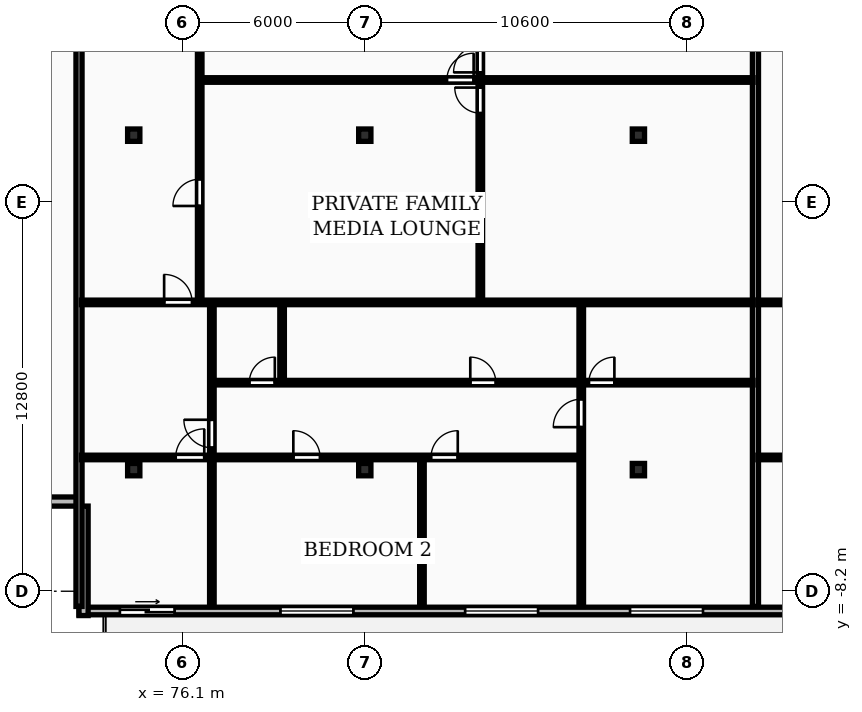
"""IFC4 building model, lengths in metres.
Left out: names, types, materials, properties, quantities, classifications, styles, units other than length and angle.
Written with IfcOpenShell. Run it as: python <this file> out.ifc"""

import sys

from ifc_helpers import new_model, si_unit, direction, frame, frame_2d, origin, origin_2d, place, context, subcontext, project, spatial, rectangle, i_section, extrude, element, fill, save


model = new_model("IFC4")
c1 = context("Model", 3, precision=1e-05, world=origin(), true_north=direction((0.0, 1.0)))
c2 = subcontext(c1, "Body", "Model", "MODEL_VIEW")
j1 = project(units=[si_unit("LENGTHUNIT", "METRE"), si_unit("PLANEANGLEUNIT", "RADIAN")], contexts=[c1])
p1 = place(None, origin())
s1 = spatial("IfcSite", under=j1, at=p1, CompositionType="ELEMENT")
p2 = place(p1, origin())
s2 = spatial("IfcBuilding", under=s1, at=p2, CompositionType="ELEMENT")
p3 = place(p2, frame((0.0, 0.0, 139.3)))
s3 = spatial("IfcBuildingStorey", under=s2, at=p3, CompositionType="ELEMENT", Elevation=139.3)
for number, where, z_axis, x_axis in (
    (1, (74.5, -4.2, 0.0), (0.0, 0.0, 1.0), (1.0, 0.0, 0.0)),
    (2, (74.5, 6.8, 0.0), (0.0, 0.0, 1.0), (1.0, 0.0, 0.0)),
    (3, (82.1, -4.2, 0.0), (0.0, 0.0, 1.0), (1.0, 0.0, 0.0)),
    (4, (82.1, 6.8, 0.0), (0.0, 0.0, 1.0), (1.0, 0.0, 0.0)),
    (5, (91.1, -4.2, 0.0), (0.0, 0.0, 1.0), (1.0, 0.0, 0.0)),
    (6, (91.1, 6.8, 0.0), (0.0, 0.0, 1.0), (1.0, 0.0, 0.0)),
):
    element("IfcColumn", number, at=place(p3, frame(where, z_axis=z_axis, x_axis=x_axis)), inside=s3, PredefinedType="COLUMN", context=c2, shape_type="SweptSolid", body=[
        extrude(i_section(OverallWidth=0.403, OverallDepth=0.406, WebThickness=0.027, FlangeThickness=0.043, FilletRadius=0.015, at=origin_2d()), origin(), (0.0, 0.0, 1.0), 3.6),
    ])
p4 = place(p3, frame((72.7, -8.85, 0.0), z_axis=(0.0, 0.0, 1.0), x_axis=(1.0, 0.0, 0.0)))
e7 = element("IfcWall", 7, at=p4, inside=s3, PredefinedType="STANDARD", context=c2, shape_type="SweptSolid", body=[
    extrude(rectangle(XDim=58.0, YDim=0.25, at=frame_2d((29.0, 0.0))), origin(), (0.0, 0.0, 1.0), 3.31),
])
p5 = place(p4, frame((6.625, 0.0, 0.85)))
e8 = element("IfcOpeningElement", 8, at=p5, cuts=e7, PredefinedType="OPENING", context=c2, shape_type="SweptSolid", body=[
    extrude(rectangle(XDim=2.4, YDim=1.9, at=frame_2d((1.2, 0.95))), frame((0.0, 0.135, 0.0), z_axis=(0.0, -1.0, 0.0), x_axis=(1.0, 0.0, 0.0)), (0.0, 0.0, 1.0), 0.27),
])
p6 = place(p4, frame((12.7, 0.0, 0.85)))
e9 = element("IfcOpeningElement", 9, at=p6, cuts=e7, PredefinedType="OPENING", context=c2, shape_type="SweptSolid", body=[
    extrude(rectangle(XDim=2.4, YDim=1.9, at=frame_2d((1.2, 0.95))), frame((0.0, 0.135, 0.0), z_axis=(0.0, -1.0, 0.0), x_axis=(1.0, 0.0, 0.0)), (0.0, 0.0, 1.0), 0.27),
])
p7 = place(p4, frame((1.345, 0.0, 0.0)))
e10 = element("IfcOpeningElement", 10, at=p7, cuts=e7, PredefinedType="OPENING", context=c2, shape_type="SweptSolid", body=[
    extrude(rectangle(XDim=1.8, YDim=2.2, at=frame_2d((0.9, 1.1))), frame((0.0, 0.135, 0.0), z_axis=(0.0, -1.0, 0.0), x_axis=(1.0, 0.0, 0.0)), (0.0, 0.0, 1.0), 0.27),
])
p8 = place(p4, frame((18.125, 0.0, 0.85)))
e11 = element("IfcOpeningElement", 11, at=p8, cuts=e7, PredefinedType="OPENING", context=c2, shape_type="SweptSolid", body=[
    extrude(rectangle(XDim=2.4, YDim=1.9, at=frame_2d((1.2, 0.95))), frame((0.0, 0.135, 0.0), z_axis=(0.0, -1.0, 0.0), x_axis=(1.0, 0.0, 0.0)), (0.0, 0.0, 1.0), 0.27),
])
p9 = place(p4, frame((27.429, 0.0, 0.0)))
e12 = element("IfcOpeningElement", 12, at=p9, cuts=e7, PredefinedType="OPENING", context=c2, shape_type="SweptSolid", body=[
    extrude(rectangle(XDim=1.8, YDim=2.2, at=frame_2d((0.9, 1.1))), frame((0.0, 0.135, 0.0), z_axis=(0.0, -1.0, 0.0), x_axis=(1.0, 0.0, 0.0)), (0.0, 0.0, 1.0), 0.27),
])
p10 = place(p4, frame((35.038, 0.0, 0.85)))
e13 = element("IfcOpeningElement", 13, at=p10, cuts=e7, PredefinedType="OPENING", context=c2, shape_type="SweptSolid", body=[
    extrude(rectangle(XDim=1.8, YDim=1.8, at=frame_2d((0.9, 0.9))), frame((0.0, 0.135, 0.0), z_axis=(0.0, -1.0, 0.0), x_axis=(1.0, 0.0, 0.0)), (0.0, 0.0, 1.0), 0.27),
])
p11 = place(p4, frame((43.911, 0.0, 0.85)))
e14 = element("IfcOpeningElement", 14, at=p11, cuts=e7, PredefinedType="OPENING", context=c2, shape_type="SweptSolid", body=[
    extrude(rectangle(XDim=2.4, YDim=1.9, at=frame_2d((1.2, 0.95))), frame((0.0, 0.135, 0.0), z_axis=(0.0, -1.0, 0.0), x_axis=(1.0, 0.0, 0.0)), (0.0, 0.0, 1.0), 0.27),
])
p12 = place(p4, frame((49.387, 0.0, 0.85)))
e15 = element("IfcOpeningElement", 15, at=p12, cuts=e7, PredefinedType="OPENING", context=c2, shape_type="SweptSolid", body=[
    extrude(rectangle(XDim=2.4, YDim=1.9, at=frame_2d((1.2, 0.95))), frame((0.0, 0.135, 0.0), z_axis=(0.0, -1.0, 0.0), x_axis=(1.0, 0.0, 0.0)), (0.0, 0.0, 1.0), 0.27),
])
p13 = place(p4, frame((39.263, 0.0, 0.0)))
e16 = element("IfcOpeningElement", 16, at=p13, cuts=e7, PredefinedType="OPENING", context=c2, shape_type="SweptSolid", body=[
    extrude(rectangle(XDim=1.8, YDim=2.2, at=frame_2d((0.9, 1.1))), frame((0.0, 0.135, 0.0), z_axis=(0.0, -1.0, 0.0), x_axis=(1.0, 0.0, 0.0)), (0.0, 0.0, 1.0), 0.27),
])
p14 = place(p4, frame((54.465, 0.0, 0.85)))
e17 = element("IfcOpeningElement", 17, at=p14, cuts=e7, PredefinedType="OPENING", context=c2, shape_type="SweptSolid", body=[
    extrude(rectangle(XDim=2.4, YDim=1.9, at=frame_2d((1.2, 0.95))), frame((0.0, 0.135, 0.0), z_axis=(0.0, -1.0, 0.0), x_axis=(1.0, 0.0, 0.0)), (0.0, 0.0, 1.0), 0.27),
])
p15 = place(p3, frame((69.1, -5.25, 0.0), z_axis=(0.0, 0.0, 1.0), x_axis=(1.0, 0.0, 0.0)))
e18 = element("IfcWall", 18, at=p15, inside=s3, PredefinedType="STANDARD", context=c2, shape_type="SweptSolid", body=[
    extrude(rectangle(XDim=3.6, YDim=0.3, at=frame_2d((1.8, 0.0))), origin(), (0.0, 0.0, 1.0), 3.31),
])
p16 = place(p3, frame((72.85, -5.4, 0.0), z_axis=(0.0, 0.0, 1.0), x_axis=(0.0, -1.0, 0.0)))
e19 = element("IfcWall", 19, at=p16, inside=s3, PredefinedType="STANDARD", context=c2, shape_type="SweptSolid", body=[
    extrude(rectangle(XDim=3.6, YDim=0.3, at=frame_2d((1.8, 0.0))), origin(), (0.0, 0.0, 1.0), 3.31),
])
for number, where, z_axis, x_axis in (
    (20, (72.7, -8.7, 0.0), (0.0, 0.0, 1.0), (0.0, 1.0, 0.0)),
    (21, (94.95, -8.7, 0.0), (0.0, 0.0, 1.0), (0.0, 1.0, 0.0)),
):
    element("IfcWall", number, at=place(p3, frame(where, z_axis=z_axis, x_axis=x_axis)), inside=s3, PredefinedType="PARTITIONING", context=c2, shape_type="SweptSolid", body=[
        extrude(rectangle(XDim=24.57, YDim=0.2, at=frame_2d((12.285, 0.0))), origin(), (0.0, 0.0, 1.0), 3.31),
    ])
p17 = place(p3, frame((85.9, 1.34, 0.0), z_axis=(0.0, 0.0, 1.0), x_axis=(0.0, 1.0, 0.0)))
e22 = element("IfcWall", 22, at=p17, inside=s3, PredefinedType="PARTITIONING", context=c2, shape_type="SweptSolid", body=[
    extrude(rectangle(XDim=14.55, YDim=0.15, at=frame_2d((7.275, 0.0))), origin(), (0.0, 0.0, 1.0), 3.31),
])
p18 = place(p17, frame((6.185, 0.0, 0.0)))
e23 = element("IfcOpeningElement", 23, at=p18, cuts=e22, PredefinedType="OPENING", context=c2, shape_type="SweptSolid", body=[
    extrude(rectangle(XDim=0.84, YDim=2.04, at=frame_2d((0.42, 1.02))), frame((0.0, 0.085, 0.0), z_axis=(0.0, -1.0, 0.0), x_axis=(1.0, 0.0, 0.0)), (0.0, 0.0, 1.0), 0.17),
])
p19 = place(p17, frame((7.525, 0.0, 0.0)))
e24 = element("IfcOpeningElement", 24, at=p19, cuts=e22, PredefinedType="OPENING", context=c2, shape_type="SweptSolid", body=[
    extrude(rectangle(XDim=0.88, YDim=2.06, at=frame_2d((0.44, 1.03))), frame((0.0, 0.085, 0.0), z_axis=(0.0, -1.0, 0.0), x_axis=(1.0, 0.0, 0.0)), (0.0, 0.0, 1.0), 0.17),
])
p20 = place(p3, frame((76.73, 8.615, 0.0), z_axis=(0.0, 0.0, 1.0), x_axis=(1.0, 0.0, 0.0)))
e25 = element("IfcWall", 25, at=p20, inside=s3, PredefinedType="PARTITIONING", context=c2, shape_type="SweptSolid", body=[
    extrude(rectangle(XDim=18.14, YDim=0.15, at=frame_2d((9.07, 0.0))), origin(), (0.0, 0.0, 1.0), 3.31),
])
p21 = place(p20, frame((8.07, 0.0, 0.0)))
e26 = element("IfcOpeningElement", 26, at=p21, cuts=e25, PredefinedType="OPENING", context=c2, shape_type="SweptSolid", body=[
    extrude(rectangle(XDim=0.88, YDim=2.06, at=frame_2d((0.44, 1.03))), frame((0.0, 0.085, 0.0), z_axis=(0.0, -1.0, 0.0), x_axis=(1.0, 0.0, 0.0)), (0.0, 0.0, 1.0), 0.17),
])
p22 = place(p3, frame((76.67, 1.34, 0.0), z_axis=(0.0, 0.0, 1.0), x_axis=(0.0, 1.0, 0.0)))
e27 = element("IfcWall", 27, at=p22, inside=s3, PredefinedType="PARTITIONING", context=c2, shape_type="SweptSolid", body=[
    extrude(rectangle(XDim=14.55, YDim=0.15, at=frame_2d((7.275, 0.0))), origin(), (0.0, 0.0, 1.0), 3.31),
])
p23 = place(p22, frame((3.132, 0.0, 0.0)))
e28 = element("IfcOpeningElement", 28, at=p23, cuts=e27, PredefinedType="OPENING", context=c2, shape_type="SweptSolid", body=[
    extrude(rectangle(XDim=0.88, YDim=2.06, at=frame_2d((0.44, 1.03))), frame((0.0, 0.085, 0.0), z_axis=(0.0, -1.0, 0.0), x_axis=(1.0, 0.0, 0.0)), (0.0, 0.0, 1.0), 0.17),
])
p24 = place(p3, frame((79.38, -1.32, 0.0), z_axis=(0.0, 0.0, 1.0), x_axis=(0.0, 1.0, 0.0)))
e29 = element("IfcWall", 29, at=p24, inside=s3, PredefinedType="PARTITIONING", context=c2, shape_type="SweptSolid", body=[
    extrude(rectangle(XDim=2.58, YDim=0.15, at=frame_2d((1.29, 0.0))), origin(), (0.0, 0.0, 1.0), 3.31),
])
p25 = place(p3, frame((83.98, -8.7, 0.0), z_axis=(0.0, 0.0, 1.0), x_axis=(0.0, 1.0, 0.0)))
e30 = element("IfcWall", 30, at=p25, inside=s3, PredefinedType="PARTITIONING", context=c2, shape_type="SweptSolid", body=[
    extrude(rectangle(XDim=4.82, YDim=0.15, at=frame_2d((2.41, 0.0))), origin(), (0.0, 0.0, 1.0), 3.31),
])
p26 = place(p3, frame((77.07, -8.7, 0.0), z_axis=(0.0, 0.0, 1.0), x_axis=(0.0, 1.0, 0.0)))
e31 = element("IfcWall", 31, at=p26, inside=s3, PredefinedType="PARTITIONING", context=c2, shape_type="SweptSolid", body=[
    extrude(rectangle(XDim=9.96, YDim=0.15, at=frame_2d((4.98, 0.0))), origin(), (0.0, 0.0, 1.0), 3.31),
])
p27 = place(p26, frame((5.22, 0.0, 0.0)))
e32 = element("IfcOpeningElement", 32, at=p27, cuts=e31, PredefinedType="OPENING", context=c2, shape_type="SweptSolid", body=[
    extrude(rectangle(XDim=0.92, YDim=2.08, at=frame_2d((0.46, 1.04))), frame((0.0, 0.085, 0.0), z_axis=(0.0, -1.0, 0.0), x_axis=(1.0, 0.0, 0.0)), (0.0, 0.0, 1.0), 0.17),
])
p28 = place(p3, frame((89.22, -1.32, 0.0), z_axis=(0.0, 0.0, 1.0), x_axis=(0.0, 1.0, 0.0)))
e33 = element("IfcWall", 33, at=p28, inside=s3, PredefinedType="PARTITIONING", context=c2, shape_type="SweptSolid", body=[
    extrude(rectangle(XDim=2.58, YDim=0.15, at=frame_2d((1.29, 0.0))), origin(), (0.0, 0.0, 1.0), 3.31),
])
p29 = place(p3, frame((89.22, -8.7, 0.0), z_axis=(0.0, 0.0, 1.0), x_axis=(0.0, 1.0, 0.0)))
e34 = element("IfcWall", 34, at=p29, inside=s3, PredefinedType="PARTITIONING", context=c2, shape_type="SweptSolid", body=[
    extrude(rectangle(XDim=7.34, YDim=0.15, at=frame_2d((3.67, 0.0))), origin(), (0.0, 0.0, 1.0), 3.31),
])
p30 = place(p29, frame((5.897, 0.0, 0.0)))
e35 = element("IfcOpeningElement", 35, at=p30, cuts=e34, PredefinedType="OPENING", context=c2, shape_type="SweptSolid", body=[
    extrude(rectangle(XDim=0.92, YDim=2.08, at=frame_2d((0.46, 1.04))), frame((0.0, 0.085, 0.0), z_axis=(0.0, -1.0, 0.0), x_axis=(1.0, 0.0, 0.0)), (0.0, 0.0, 1.0), 0.17),
])
p31 = place(p3, frame((77.11, -1.34, 0.0), z_axis=(0.0, 0.0, 1.0), x_axis=(1.0, 0.0, 0.0)))
e36 = element("IfcWall", 36, at=p31, inside=s3, PredefinedType="PARTITIONING", context=c2, shape_type="SweptSolid", body=[
    extrude(rectangle(XDim=17.76, YDim=0.15, at=frame_2d((8.88, 0.0))), origin(), (0.0, 0.0, 1.0), 3.31),
])
p32 = place(p31, frame((1.191, 0.0, 0.0)))
e37 = element("IfcOpeningElement", 37, at=p32, cuts=e36, PredefinedType="OPENING", context=c2, shape_type="SweptSolid", body=[
    extrude(rectangle(XDim=0.84, YDim=2.04, at=frame_2d((0.42, 1.02))), frame((0.0, 0.085, 0.0), z_axis=(0.0, -1.0, 0.0), x_axis=(1.0, 0.0, 0.0)), (0.0, 0.0, 1.0), 0.17),
])
p33 = place(p31, frame((8.46, 0.0, 0.0)))
e38 = element("IfcOpeningElement", 38, at=p33, cuts=e36, PredefinedType="OPENING", context=c2, shape_type="SweptSolid", body=[
    extrude(rectangle(XDim=0.84, YDim=2.04, at=frame_2d((0.42, 1.02))), frame((0.0, 0.085, 0.0), z_axis=(0.0, -1.0, 0.0), x_axis=(1.0, 0.0, 0.0)), (0.0, 0.0, 1.0), 0.17),
])
p34 = place(p31, frame((12.36, 0.0, 0.0)))
e39 = element("IfcOpeningElement", 39, at=p34, cuts=e36, PredefinedType="OPENING", context=c2, shape_type="SweptSolid", body=[
    extrude(rectangle(XDim=0.84, YDim=2.04, at=frame_2d((0.42, 1.02))), frame((0.0, 0.085, 0.0), z_axis=(0.0, -1.0, 0.0), x_axis=(1.0, 0.0, 0.0)), (0.0, 0.0, 1.0), 0.17),
])
p35 = place(p3, frame((72.78, 1.3, 0.0), z_axis=(0.0, 0.0, 1.0), x_axis=(1.0, 0.0, 0.0)))
e40 = element("IfcWall", 40, at=p35, inside=s3, PredefinedType="PARTITIONING", context=c2, shape_type="SweptSolid", body=[
    extrude(rectangle(XDim=22.09, YDim=0.15, at=frame_2d((11.045, 0.0))), origin(), (0.0, 0.0, 1.0), 3.31),
])
p36 = place(p35, frame((2.72, 0.0, 0.0)))
e41 = element("IfcOpeningElement", 41, at=p36, cuts=e40, PredefinedType="OPENING", context=c2, shape_type="SweptSolid", body=[
    extrude(rectangle(XDim=0.92, YDim=2.08, at=frame_2d((0.46, 1.04))), frame((0.0, 0.085, 0.0), z_axis=(0.0, -1.0, 0.0), x_axis=(1.0, 0.0, 0.0)), (0.0, 0.0, 1.0), 0.17),
])
p37 = place(p3, frame((72.78, -3.8, 0.0), z_axis=(0.0, 0.0, 1.0), x_axis=(1.0, 0.0, 0.0)))
e42 = element("IfcWall", 42, at=p37, inside=s3, PredefinedType="PARTITIONING", context=c2, shape_type="SweptSolid", body=[
    extrude(rectangle(XDim=16.44, YDim=0.15, at=frame_2d((8.22, 0.0))), origin(), (0.0, 0.0, 1.0), 3.31),
])
p38 = place(p37, frame((3.1, 0.0, 0.0)))
e43 = element("IfcOpeningElement", 43, at=p38, cuts=e42, PredefinedType="OPENING", context=c2, shape_type="SweptSolid", body=[
    extrude(rectangle(XDim=0.94, YDim=2.1, at=frame_2d((0.47, 1.05))), frame((0.0, 0.085, 0.0), z_axis=(0.0, -1.0, 0.0), x_axis=(1.0, 0.0, 0.0)), (0.0, 0.0, 1.0), 0.17),
])
p39 = place(p37, frame((6.969, 0.0, 0.0)))
e44 = element("IfcOpeningElement", 44, at=p39, cuts=e42, PredefinedType="OPENING", context=c2, shape_type="SweptSolid", body=[
    extrude(rectangle(XDim=0.88, YDim=2.06, at=frame_2d((0.44, 1.03))), frame((0.0, 0.085, 0.0), z_axis=(0.0, -1.0, 0.0), x_axis=(1.0, 0.0, 0.0)), (0.0, 0.0, 1.0), 0.17),
])
p40 = place(p37, frame((11.498, 0.0, 0.0)))
e45 = element("IfcOpeningElement", 45, at=p40, cuts=e42, PredefinedType="OPENING", context=c2, shape_type="SweptSolid", body=[
    extrude(rectangle(XDim=0.88, YDim=2.06, at=frame_2d((0.44, 1.03))), frame((0.0, 0.085, 0.0), z_axis=(0.0, -1.0, 0.0), x_axis=(1.0, 0.0, 0.0)), (0.0, 0.0, 1.0), 0.17),
])
p41 = place(p3, frame((95.03, 1.3, 0.0), z_axis=(0.0, 0.0, 1.0), x_axis=(1.0, 0.0, 0.0)))
e46 = element("IfcWall", 46, at=p41, inside=s3, PredefinedType="PARTITIONING", context=c2, shape_type="SweptSolid", body=[
    extrude(rectangle(XDim=15.298, YDim=0.15, at=frame_2d((7.649, 0.0))), origin(), (0.0, 0.0, 1.0), 3.31),
])
p42 = place(p41, frame((2.72, 0.0, 0.0)))
e47 = element("IfcOpeningElement", 47, at=p42, cuts=e46, PredefinedType="OPENING", context=c2, shape_type="SweptSolid", body=[
    extrude(rectangle(XDim=0.92, YDim=2.08, at=frame_2d((0.46, 1.04))), frame((0.0, 0.085, 0.0), z_axis=(0.0, -1.0, 0.0), x_axis=(1.0, 0.0, 0.0)), (0.0, 0.0, 1.0), 0.17),
])
p43 = place(p3, frame((95.03, -3.8, 0.0), z_axis=(0.0, 0.0, 1.0), x_axis=(1.0, 0.0, 0.0)))
e48 = element("IfcWall", 48, at=p43, inside=s3, PredefinedType="PARTITIONING", context=c2, shape_type="SweptSolid", body=[
    extrude(rectangle(XDim=15.298, YDim=0.15, at=frame_2d((7.649, 0.0))), origin(), (0.0, 0.0, 1.0), 3.31),
])
p44 = place(p43, frame((7.179, 0.0, 0.0)))
e49 = element("IfcOpeningElement", 49, at=p44, cuts=e48, PredefinedType="OPENING", context=c2, shape_type="SweptSolid", body=[
    extrude(rectangle(XDim=0.94, YDim=2.1, at=frame_2d((0.47, 1.05))), frame((0.0, 0.085, 0.0), z_axis=(0.0, -1.0, 0.0), x_axis=(1.0, 0.0, 0.0)), (0.0, 0.0, 1.0), 0.17),
])
p45 = place(p5, origin())
e50 = element("IfcWindow", 50, at=p45, inside=s3, PartitioningType="DOUBLE_PANEL_VERTICAL", PredefinedType="WINDOW", context=c2, shape_type="SweptSolid", body=[
    extrude(rectangle(XDim=2.4, YDim=1.9, at=frame_2d((1.2, 0.95))), frame((0.0, 0.03, 0.0), z_axis=(0.0, -1.0, 0.0), x_axis=(1.0, 0.0, 0.0)), (0.0, 0.0, 1.0), 0.06),
])
fill(e8, e50)
p46 = place(p6, origin())
e51 = element("IfcWindow", 51, at=p46, inside=s3, PartitioningType="DOUBLE_PANEL_VERTICAL", PredefinedType="WINDOW", context=c2, shape_type="SweptSolid", body=[
    extrude(rectangle(XDim=2.4, YDim=1.9, at=frame_2d((1.2, 0.95))), frame((0.0, 0.03, 0.0), z_axis=(0.0, -1.0, 0.0), x_axis=(1.0, 0.0, 0.0)), (0.0, 0.0, 1.0), 0.06),
])
fill(e9, e51)
p47 = place(p7, origin())
e52 = element("IfcDoor", 52, at=p47, inside=s3, OperationType="SLIDING_TO_RIGHT", PredefinedType="DOOR", context=c2, shape_type="SweptSolid", body=[
    extrude(rectangle(XDim=1.8, YDim=2.2, at=frame_2d((0.9, 1.1))), frame((0.0, 0.025, 0.0), z_axis=(0.0, -1.0, 0.0), x_axis=(1.0, 0.0, 0.0)), (0.0, 0.0, 1.0), 0.05),
])
fill(e10, e52)
p48 = place(p8, origin())
e53 = element("IfcWindow", 53, at=p48, inside=s3, PartitioningType="DOUBLE_PANEL_VERTICAL", PredefinedType="WINDOW", context=c2, shape_type="SweptSolid", body=[
    extrude(rectangle(XDim=2.4, YDim=1.9, at=frame_2d((1.2, 0.95))), frame((0.0, 0.03, 0.0), z_axis=(0.0, -1.0, 0.0), x_axis=(1.0, 0.0, 0.0)), (0.0, 0.0, 1.0), 0.06),
])
fill(e11, e53)
p49 = place(p18, origin())
e54 = element("IfcDoor", 54, at=p49, inside=s3, OperationType="SINGLE_SWING_RIGHT", PredefinedType="DOOR", context=c2, shape_type="SweptSolid", body=[
    extrude(rectangle(XDim=0.84, YDim=2.04, at=frame_2d((0.42, 1.02))), frame((0.0, 0.025, 0.0), z_axis=(0.0, -1.0, 0.0), x_axis=(1.0, 0.0, 0.0)), (0.0, 0.0, 1.0), 0.05),
])
fill(e23, e54)
p50 = place(p19, origin())
e55 = element("IfcDoor", 55, at=p50, inside=s3, OperationType="SINGLE_SWING_LEFT", PredefinedType="DOOR", context=c2, shape_type="SweptSolid", body=[
    extrude(rectangle(XDim=0.88, YDim=2.06, at=frame_2d((0.44, 1.03))), frame((0.0, 0.025, 0.0), z_axis=(0.0, -1.0, 0.0), x_axis=(1.0, 0.0, 0.0)), (0.0, 0.0, 1.0), 0.05),
])
fill(e24, e55)
p51 = place(p21, origin())
e56 = element("IfcDoor", 56, at=p51, inside=s3, OperationType="SINGLE_SWING_RIGHT", PredefinedType="DOOR", context=c2, shape_type="SweptSolid", body=[
    extrude(rectangle(XDim=0.88, YDim=2.06, at=frame_2d((0.44, 1.03))), frame((0.0, 0.025, 0.0), z_axis=(0.0, -1.0, 0.0), x_axis=(1.0, 0.0, 0.0)), (0.0, 0.0, 1.0), 0.05),
])
fill(e26, e56)
p52 = place(p23, origin())
e57 = element("IfcDoor", 57, at=p52, inside=s3, OperationType="SINGLE_SWING_LEFT", PredefinedType="DOOR", context=c2, shape_type="SweptSolid", body=[
    extrude(rectangle(XDim=0.88, YDim=2.06, at=frame_2d((0.44, 1.03))), frame((0.0, 0.025, 0.0), z_axis=(0.0, -1.0, 0.0), x_axis=(1.0, 0.0, 0.0)), (0.0, 0.0, 1.0), 0.05),
])
fill(e28, e57)
p53 = place(p27, origin())
e58 = element("IfcDoor", 58, at=p53, inside=s3, OperationType="SINGLE_SWING_RIGHT", PredefinedType="DOOR", context=c2, shape_type="SweptSolid", body=[
    extrude(rectangle(XDim=0.92, YDim=2.08, at=frame_2d((0.46, 1.04))), frame((0.0, 0.025, 0.0), z_axis=(0.0, -1.0, 0.0), x_axis=(1.0, 0.0, 0.0)), (0.0, 0.0, 1.0), 0.05),
])
fill(e32, e58)
p54 = place(p30, origin())
e59 = element("IfcDoor", 59, at=p54, inside=s3, OperationType="SINGLE_SWING_LEFT", PredefinedType="DOOR", context=c2, shape_type="SweptSolid", body=[
    extrude(rectangle(XDim=0.92, YDim=2.08, at=frame_2d((0.46, 1.04))), frame((0.0, 0.025, 0.0), z_axis=(0.0, -1.0, 0.0), x_axis=(1.0, 0.0, 0.0)), (0.0, 0.0, 1.0), 0.05),
])
fill(e35, e59)
p55 = place(p32, origin())
e60 = element("IfcDoor", 60, at=p55, inside=s3, OperationType="SINGLE_SWING_RIGHT", PredefinedType="DOOR", context=c2, shape_type="SweptSolid", body=[
    extrude(rectangle(XDim=0.84, YDim=2.04, at=frame_2d((0.42, 1.02))), frame((0.0, 0.025, 0.0), z_axis=(0.0, -1.0, 0.0), x_axis=(1.0, 0.0, 0.0)), (0.0, 0.0, 1.0), 0.05),
])
fill(e37, e60)
p56 = place(p33, origin())
e61 = element("IfcDoor", 61, at=p56, inside=s3, OperationType="SINGLE_SWING_LEFT", PredefinedType="DOOR", context=c2, shape_type="SweptSolid", body=[
    extrude(rectangle(XDim=0.84, YDim=2.04, at=frame_2d((0.42, 1.02))), frame((0.0, 0.025, 0.0), z_axis=(0.0, -1.0, 0.0), x_axis=(1.0, 0.0, 0.0)), (0.0, 0.0, 1.0), 0.05),
])
fill(e38, e61)
p57 = place(p34, origin())
e62 = element("IfcDoor", 62, at=p57, inside=s3, OperationType="SINGLE_SWING_RIGHT", PredefinedType="DOOR", context=c2, shape_type="SweptSolid", body=[
    extrude(rectangle(XDim=0.84, YDim=2.04, at=frame_2d((0.42, 1.02))), frame((0.0, 0.025, 0.0), z_axis=(0.0, -1.0, 0.0), x_axis=(1.0, 0.0, 0.0)), (0.0, 0.0, 1.0), 0.05),
])
fill(e39, e62)
p58 = place(p36, origin())
e63 = element("IfcDoor", 63, at=p58, inside=s3, OperationType="SINGLE_SWING_LEFT", PredefinedType="DOOR", context=c2, shape_type="SweptSolid", body=[
    extrude(rectangle(XDim=0.92, YDim=2.08, at=frame_2d((0.46, 1.04))), frame((0.0, 0.025, 0.0), z_axis=(0.0, -1.0, 0.0), x_axis=(1.0, 0.0, 0.0)), (0.0, 0.0, 1.0), 0.05),
])
fill(e41, e63)
p59 = place(p38, origin())
e64 = element("IfcDoor", 64, at=p59, inside=s3, OperationType="SINGLE_SWING_RIGHT", PredefinedType="DOOR", context=c2, shape_type="SweptSolid", body=[
    extrude(rectangle(XDim=0.94, YDim=2.1, at=frame_2d((0.47, 1.05))), frame((0.0, 0.025, 0.0), z_axis=(0.0, -1.0, 0.0), x_axis=(1.0, 0.0, 0.0)), (0.0, 0.0, 1.0), 0.05),
])
fill(e43, e64)
p60 = place(p39, origin())
e65 = element("IfcDoor", 65, at=p60, inside=s3, OperationType="SINGLE_SWING_LEFT", PredefinedType="DOOR", context=c2, shape_type="SweptSolid", body=[
    extrude(rectangle(XDim=0.88, YDim=2.06, at=frame_2d((0.44, 1.03))), frame((0.0, 0.025, 0.0), z_axis=(0.0, -1.0, 0.0), x_axis=(1.0, 0.0, 0.0)), (0.0, 0.0, 1.0), 0.05),
])
fill(e44, e65)
p61 = place(p40, origin())
e66 = element("IfcDoor", 66, at=p61, inside=s3, OperationType="SINGLE_SWING_RIGHT", PredefinedType="DOOR", context=c2, shape_type="SweptSolid", body=[
    extrude(rectangle(XDim=0.88, YDim=2.06, at=frame_2d((0.44, 1.03))), frame((0.0, 0.025, 0.0), z_axis=(0.0, -1.0, 0.0), x_axis=(1.0, 0.0, 0.0)), (0.0, 0.0, 1.0), 0.05),
])
fill(e45, e66)
save(model, sys.argv[1])
